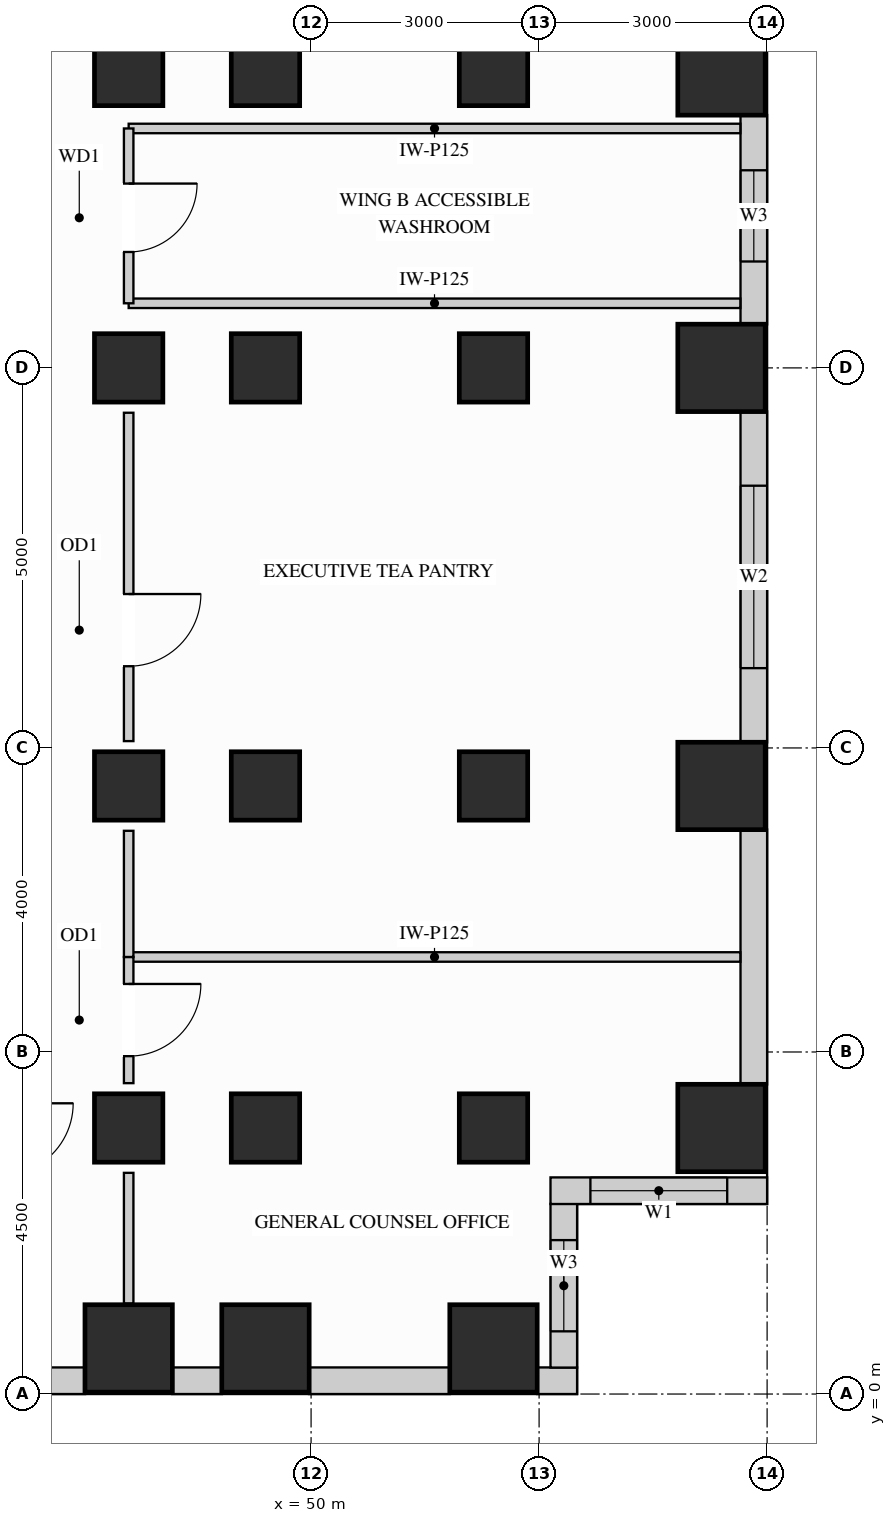
"""IFC4 building model, lengths in metres.
Left out: names, types, materials, properties, quantities, classifications, styles, units other than length and angle.
Written with IfcOpenShell. Run it as: python <this file> out.ifc"""

import sys

from ifc_helpers import new_model, si_unit, direction, frame, frame_2d, origin, origin_2d, place, context, subcontext, project, spatial, rectangle, extrude, source, transform, mapped, element, fill, save


model = new_model("IFC4")
c1 = context("Model", 3, precision=1e-05, world=origin(), true_north=direction((0.0, 1.0)))
c2 = subcontext(c1, "Body", "Model", "MODEL_VIEW")
j1 = project(units=[si_unit("LENGTHUNIT", "METRE"), si_unit("PLANEANGLEUNIT", "RADIAN")], contexts=[c1])
p1 = place(None, origin())
s1 = spatial("IfcSite", under=j1, at=p1, CompositionType="ELEMENT")
p2 = place(p1, origin())
s2 = spatial("IfcBuilding", under=s1, at=p2, CompositionType="ELEMENT")
p3 = place(p2, frame((0.0, 0.0, 113.4)))
s3 = spatial("IfcBuildingStorey", under=s2, at=p3, CompositionType="ELEMENT", Elevation=113.4)
m1 = source(origin(), c2, "Body", "SweptSolid", [
    extrude(rectangle(XDim=0.9, YDim=0.9, at=origin_2d()), origin(), (0.0, 0.0, 1.0), 3.38),
])
for number, where, z_axis, x_axis in (
    (1, (47.6, 13.5, 0.0), (0.0, 0.0, 1.0), (1.0, 0.0, 0.0)),
    (2, (47.6, 3.5, 0.0), (0.0, 0.0, 1.0), (1.0, 0.0, 0.0)),
    (3, (47.6, 8.0, 0.0), (0.0, 0.0, 1.0), (1.0, 0.0, 0.0)),
    (4, (47.6, 17.4, 0.0), (0.0, 0.0, 1.0), (1.0, 0.0, 0.0)),
    (5, (49.4, 13.5, 0.0), (0.0, 0.0, 1.0), (1.0, 0.0, 0.0)),
    (6, (49.4, 17.4, 0.0), (0.0, 0.0, 1.0), (1.0, 0.0, 0.0)),
    (7, (49.4, 3.5, 0.0), (0.0, 0.0, 1.0), (1.0, 0.0, 0.0)),
    (8, (49.4, 8.0, 0.0), (0.0, 0.0, 1.0), (1.0, 0.0, 0.0)),
    (9, (52.4, 13.5, 0.0), (0.0, 0.0, 1.0), (1.0, 0.0, 0.0)),
    (10, (52.4, 17.4, 0.0), (0.0, 0.0, 1.0), (1.0, 0.0, 0.0)),
    (11, (52.4, 3.5, 0.0), (0.0, 0.0, 1.0), (1.0, 0.0, 0.0)),
    (12, (52.4, 8.0, 0.0), (0.0, 0.0, 1.0), (1.0, 0.0, 0.0)),
):
    element("IfcColumn", number, at=place(p3, frame(where, z_axis=z_axis, x_axis=x_axis)), inside=s3, PredefinedType="COLUMN", context=c2, shape_type="MappedRepresentation", body=[
        mapped(m1, transform((0.0, 0.0, 0.0), x_axis=(1.0, 0.0, 0.0), y_axis=(0.0, 1.0, 0.0), z_axis=(0.0, 0.0, 1.0))),
    ])
m2 = source(origin(), c2, "Body", "SweptSolid", [
    extrude(rectangle(XDim=1.15, YDim=1.15, at=origin_2d()), origin(), (0.0, 0.0, 1.0), 3.38),
])
for number, where, z_axis, x_axis in (
    (13, (55.4, 13.5, 0.0), (0.0, 0.0, 1.0), (1.0, 0.0, 0.0)),
    (14, (55.4, 17.4, 0.0), (0.0, 0.0, 1.0), (1.0, 0.0, 0.0)),
    (15, (55.4, 3.5, 0.0), (0.0, 0.0, 1.0), (1.0, 0.0, 0.0)),
    (16, (55.4, 8.0, 0.0), (0.0, 0.0, 1.0), (1.0, 0.0, 0.0)),
    (17, (47.6, 0.6, 0.0), (0.0, 0.0, 1.0), (1.0, 0.0, 0.0)),
    (18, (49.4, 0.6, 0.0), (0.0, 0.0, 1.0), (1.0, 0.0, 0.0)),
    (19, (52.4, 0.6, 0.0), (0.0, 0.0, 1.0), (1.0, 0.0, 0.0)),
):
    element("IfcColumn", number, at=place(p3, frame(where, z_axis=z_axis, x_axis=x_axis)), inside=s3, PredefinedType="COLUMN", context=c2, shape_type="MappedRepresentation", body=[
        mapped(m2, transform((0.0, 0.0, 0.0), x_axis=(1.0, 0.0, 0.0), y_axis=(0.0, 1.0, 0.0), z_axis=(0.0, 0.0, 1.0))),
    ])
p4 = place(p3, frame((40.573, 0.175, 0.0), z_axis=(0.0, 0.0, 1.0), x_axis=(1.0, 0.0, 0.0)))
e20 = element("IfcWall", 20, at=p4, inside=s3, PredefinedType="SOLIDWALL", context=c2, shape_type="SweptSolid", body=[
    extrude(rectangle(XDim=6.454, YDim=0.35, at=frame_2d((3.227, 0.0))), origin(), (0.0, 0.0, 1.0), 3.365),
])
p5 = place(p4, frame((0.712, 0.0, 0.78)))
e21 = element("IfcOpeningElement", 21, at=p5, cuts=e20, PredefinedType="OPENING", context=c2, shape_type="SweptSolid", body=[
    extrude(rectangle(XDim=1.8, YDim=2.1, at=frame_2d((0.9, 1.05))), frame((0.0, 0.185, 0.0), z_axis=(0.0, -1.0, 0.0), x_axis=(1.0, 0.0, 0.0)), (0.0, 0.0, 1.0), 0.37),
])
p6 = place(p4, frame((2.905, 0.0, 0.78)))
e22 = element("IfcOpeningElement", 22, at=p6, cuts=e20, PredefinedType="OPENING", context=c2, shape_type="SweptSolid", body=[
    extrude(rectangle(XDim=1.8, YDim=2.1, at=frame_2d((0.9, 1.05))), frame((0.0, 0.185, 0.0), z_axis=(0.0, -1.0, 0.0), x_axis=(1.0, 0.0, 0.0)), (0.0, 0.0, 1.0), 0.37),
])
m3 = source(origin(), c2, "Body", "SweptSolid", [
    extrude(rectangle(XDim=0.654, YDim=0.35, at=frame_2d((0.327, 0.0))), origin(), (0.0, 0.0, 1.0), 3.365),
])
p7 = place(p3, frame((48.173, 0.175, 0.0), z_axis=(0.0, 0.0, 1.0), x_axis=(1.0, 0.0, 0.0)))
e23 = element("IfcWall", 23, at=p7, inside=s3, PredefinedType="SOLIDWALL", context=c2, shape_type="MappedRepresentation", body=[
    mapped(m3, transform((0.0, 0.0, 0.0), x_axis=(1.0, 0.0, 0.0), y_axis=(0.0, 1.0, 0.0), z_axis=(0.0, 0.0, 1.0))),
])
m4 = source(origin(), c2, "Body", "SweptSolid", [
    extrude(rectangle(XDim=1.854, YDim=0.35, at=frame_2d((0.927, 0.0))), origin(), (0.0, 0.0, 1.0), 3.365),
])
p8 = place(p3, frame((49.973, 0.175, 0.0), z_axis=(0.0, 0.0, 1.0), x_axis=(1.0, 0.0, 0.0)))
e24 = element("IfcWall", 24, at=p8, inside=s3, PredefinedType="SOLIDWALL", context=c2, shape_type="MappedRepresentation", body=[
    mapped(m4, transform((0.0, 0.0, 0.0), x_axis=(1.0, 0.0, 0.0), y_axis=(0.0, 1.0, 0.0), z_axis=(0.0, 0.0, 1.0))),
])
m5 = source(origin(), c2, "Body", "SweptSolid", [
    extrude(rectangle(XDim=0.527, YDim=0.35, at=frame_2d((0.264, 0.0))), origin(), (0.0, 0.0, 1.0), 3.365),
])
p9 = place(p3, frame((52.973, 0.175, 0.0), z_axis=(0.0, 0.0, 1.0), x_axis=(1.0, 0.0, 0.0)))
e25 = element("IfcWall", 25, at=p9, inside=s3, PredefinedType="SOLIDWALL", context=c2, shape_type="MappedRepresentation", body=[
    mapped(m5, transform((0.0, 0.0, 0.0), x_axis=(1.0, 0.0, 0.0), y_axis=(0.0, 1.0, 0.0), z_axis=(0.0, 0.0, 1.0))),
])
p10 = place(p3, frame((53.325, 0.348, 0.0), z_axis=(0.0, 0.0, 1.0), x_axis=(0.0, 1.0, 0.0)))
e26 = element("IfcWall", 26, at=p10, inside=s3, PredefinedType="SOLIDWALL", context=c2, shape_type="SweptSolid", body=[
    extrude(rectangle(XDim=2.154, YDim=0.35, at=frame_2d((1.077, 0.0))), origin(), (0.0, 0.0, 1.0), 3.365),
])
p11 = place(p10, frame((0.477, 0.0, 0.78)))
e27 = element("IfcOpeningElement", 27, at=p11, cuts=e26, PredefinedType="OPENING", context=c2, shape_type="SweptSolid", body=[
    extrude(rectangle(XDim=1.2, YDim=2.1, at=frame_2d((0.6, 1.05))), frame((0.0, 0.185, 0.0), z_axis=(0.0, -1.0, 0.0), x_axis=(1.0, 0.0, 0.0)), (0.0, 0.0, 1.0), 0.37),
])
p12 = place(p3, frame((53.15, 2.675, 0.0), z_axis=(0.0, 0.0, 1.0), x_axis=(1.0, 0.0, 0.0)))
e28 = element("IfcWall", 28, at=p12, inside=s3, PredefinedType="SOLIDWALL", context=c2, shape_type="SweptSolid", body=[
    extrude(rectangle(XDim=2.85, YDim=0.35, at=frame_2d((1.425, 0.0))), origin(), (0.0, 0.0, 1.0), 3.365),
])
p13 = place(p12, frame((0.525, 0.0, 0.78)))
e29 = element("IfcOpeningElement", 29, at=p13, cuts=e28, PredefinedType="OPENING", context=c2, shape_type="SweptSolid", body=[
    extrude(rectangle(XDim=1.8, YDim=2.1, at=frame_2d((0.9, 1.05))), frame((0.0, 0.185, 0.0), z_axis=(0.0, -1.0, 0.0), x_axis=(1.0, 0.0, 0.0)), (0.0, 0.0, 1.0), 0.37),
])
m6 = source(origin(), c2, "Body", "SweptSolid", [
    extrude(rectangle(XDim=3.354, YDim=0.35, at=frame_2d((1.677, 0.0))), origin(), (0.0, 0.0, 1.0), 3.365),
])
p14 = place(p3, frame((55.825, 4.073, 0.0), z_axis=(0.0, 0.0, 1.0), x_axis=(0.0, 1.0, 0.0)))
e30 = element("IfcWall", 30, at=p14, inside=s3, PredefinedType="SOLIDWALL", context=c2, shape_type="MappedRepresentation", body=[
    mapped(m6, transform((0.0, 0.0, 0.0), x_axis=(1.0, 0.0, 0.0), y_axis=(0.0, 1.0, 0.0), z_axis=(0.0, 0.0, 1.0))),
])
p15 = place(p3, frame((55.825, 8.573, 0.0), z_axis=(0.0, 0.0, 1.0), x_axis=(0.0, 1.0, 0.0)))
e31 = element("IfcWall", 31, at=p15, inside=s3, PredefinedType="SOLIDWALL", context=c2, shape_type="SweptSolid", body=[
    extrude(rectangle(XDim=4.354, YDim=0.35, at=frame_2d((2.177, 0.0))), origin(), (0.0, 0.0, 1.0), 3.365),
])
p16 = place(p15, frame((0.977, 0.0, 0.78)))
e32 = element("IfcOpeningElement", 32, at=p16, cuts=e31, PredefinedType="OPENING", context=c2, shape_type="SweptSolid", body=[
    extrude(rectangle(XDim=2.4, YDim=2.1, at=frame_2d((1.2, 1.05))), frame((0.0, 0.185, 0.0), z_axis=(0.0, -1.0, 0.0), x_axis=(1.0, 0.0, 0.0)), (0.0, 0.0, 1.0), 0.37),
])
p17 = place(p3, frame((55.825, 14.073, 0.0), z_axis=(0.0, 0.0, 1.0), x_axis=(0.0, 1.0, 0.0)))
e33 = element("IfcWall", 33, at=p17, inside=s3, PredefinedType="SOLIDWALL", context=c2, shape_type="SweptSolid", body=[
    extrude(rectangle(XDim=2.754, YDim=0.35, at=frame_2d((1.377, 0.0))), origin(), (0.0, 0.0, 1.0), 3.365),
])
p18 = place(p17, frame((0.827, 0.0, 0.78)))
e34 = element("IfcOpeningElement", 34, at=p18, cuts=e33, PredefinedType="OPENING", context=c2, shape_type="SweptSolid", body=[
    extrude(rectangle(XDim=1.2, YDim=2.1, at=frame_2d((0.6, 1.05))), frame((0.0, 0.185, 0.0), z_axis=(0.0, -1.0, 0.0), x_axis=(1.0, 0.0, 0.0)), (0.0, 0.0, 1.0), 0.37),
])
m7 = source(origin(), c2, "Body", "SweptSolid", [
    extrude(rectangle(XDim=8.048, YDim=0.125, at=frame_2d((4.024, 0.0))), origin(), (0.0, 0.0, 1.0), 3.365),
])
p19 = place(p3, frame((47.6, 14.35, 0.0), z_axis=(0.0, 0.0, 1.0), x_axis=(1.0, 0.0, 0.0)))
e35 = element("IfcWall", 35, at=p19, inside=s3, PredefinedType="PARTITIONING", context=c2, shape_type="MappedRepresentation", body=[
    mapped(m7, transform((0.0, 0.0, 0.0), x_axis=(1.0, 0.0, 0.0), y_axis=(0.0, 1.0, 0.0), z_axis=(0.0, 0.0, 1.0))),
])
m8 = source(origin(), c2, "Body", "SweptSolid", [
    extrude(rectangle(XDim=8.048, YDim=0.125, at=frame_2d((4.024, 0.0))), origin(), (0.0, 0.0, 1.0), 2.677),
])
p20 = place(p3, frame((47.6, 16.65, 0.0), z_axis=(0.0, 0.0, 1.0), x_axis=(1.0, 0.0, 0.0)))
e36 = element("IfcWall", 36, at=p20, inside=s3, PredefinedType="PARTITIONING", context=c2, shape_type="MappedRepresentation", body=[
    mapped(m8, transform((0.0, 0.0, 0.0), x_axis=(1.0, 0.0, 0.0), y_axis=(0.0, 1.0, 0.0), z_axis=(0.0, 0.0, 1.0))),
])
p21 = place(p3, frame((47.6, 5.75, 0.0), z_axis=(0.0, 0.0, 1.0), x_axis=(1.0, 0.0, 0.0)))
e37 = element("IfcWall", 37, at=p21, inside=s3, PredefinedType="PARTITIONING", context=c2, shape_type="MappedRepresentation", body=[
    mapped(m7, transform((0.0, 0.0, 0.0), x_axis=(1.0, 0.0, 0.0), y_axis=(0.0, 1.0, 0.0), z_axis=(0.0, 0.0, 1.0))),
])
p22 = place(p3, frame((47.6, 4.09, 0.0), z_axis=(0.0, 0.0, 1.0), x_axis=(0.0, 1.0, 0.0)))
e38 = element("IfcWall", 38, at=p22, inside=s3, PredefinedType="PARTITIONING", context=c2, shape_type="SweptSolid", body=[
    extrude(rectangle(XDim=1.66, YDim=0.125, at=frame_2d((0.83, 0.0))), origin(), (0.0, 0.0, 1.0), 2.677),
])
p23 = place(p22, frame((0.355, 0.0, 0.0)))
e39 = element("IfcOpeningElement", 39, at=p23, cuts=e38, PredefinedType="OPENING", context=c2, shape_type="SweptSolid", body=[
    extrude(rectangle(XDim=0.95, YDim=2.15, at=frame_2d((0.475, 1.075))), frame((0.0, 0.073, 0.0), z_axis=(0.0, -1.0, 0.0), x_axis=(1.0, 0.0, 0.0)), (0.0, 0.0, 1.0), 0.145),
])
m9 = source(origin(), c2, "Body", "SweptSolid", [
    extrude(rectangle(XDim=1.72, YDim=0.125, at=frame_2d((0.86, 0.0))), origin(), (0.0, 0.0, 1.0), 2.677),
])
p24 = place(p3, frame((47.6, 1.19, 0.0), z_axis=(0.0, 0.0, 1.0), x_axis=(0.0, 1.0, 0.0)))
e40 = element("IfcWall", 40, at=p24, inside=s3, PredefinedType="PARTITIONING", context=c2, shape_type="MappedRepresentation", body=[
    mapped(m9, transform((0.0, 0.0, 0.0), x_axis=(1.0, 0.0, 0.0), y_axis=(0.0, 1.0, 0.0), z_axis=(0.0, 0.0, 1.0))),
])
m10 = source(origin(), c2, "Body", "SweptSolid", [
    extrude(rectangle(XDim=1.66, YDim=0.125, at=frame_2d((0.83, 0.0))), origin(), (0.0, 0.0, 1.0), 2.677),
])
p25 = place(p3, frame((47.6, 5.75, 0.0), z_axis=(0.0, 0.0, 1.0), x_axis=(0.0, 1.0, 0.0)))
e41 = element("IfcWall", 41, at=p25, inside=s3, PredefinedType="PARTITIONING", context=c2, shape_type="MappedRepresentation", body=[
    mapped(m10, transform((0.0, 0.0, 0.0), x_axis=(1.0, 0.0, 0.0), y_axis=(0.0, 1.0, 0.0), z_axis=(0.0, 0.0, 1.0))),
])
p26 = place(p3, frame((47.6, 8.59, 0.0), z_axis=(0.0, 0.0, 1.0), x_axis=(0.0, 1.0, 0.0)))
e42 = element("IfcWall", 42, at=p26, inside=s3, PredefinedType="PARTITIONING", context=c2, shape_type="SweptSolid", body=[
    extrude(rectangle(XDim=4.32, YDim=0.125, at=frame_2d((2.16, 0.0))), origin(), (0.0, 0.0, 1.0), 2.677),
])
p27 = place(p26, frame((0.985, 0.0, 0.0)))
e43 = element("IfcOpeningElement", 43, at=p27, cuts=e42, PredefinedType="OPENING", context=c2, shape_type="SweptSolid", body=[
    extrude(rectangle(XDim=0.95, YDim=2.15, at=frame_2d((0.475, 1.075))), frame((0.0, 0.073, 0.0), z_axis=(0.0, -1.0, 0.0), x_axis=(1.0, 0.0, 0.0)), (0.0, 0.0, 1.0), 0.145),
])
p28 = place(p3, frame((47.6, 14.35, 0.0), z_axis=(0.0, 0.0, 1.0), x_axis=(0.0, 1.0, 0.0)))
e44 = element("IfcWall", 44, at=p28, inside=s3, PredefinedType="PARTITIONING", context=c2, shape_type="SweptSolid", body=[
    extrude(rectangle(XDim=2.3, YDim=0.125, at=frame_2d((1.15, 0.0))), origin(), (0.0, 0.0, 1.0), 2.677),
])
p29 = place(p28, frame((0.675, 0.0, 0.0)))
e45 = element("IfcOpeningElement", 45, at=p29, cuts=e44, PredefinedType="OPENING", context=c2, shape_type="SweptSolid", body=[
    extrude(rectangle(XDim=0.9, YDim=2.15, at=frame_2d((0.45, 1.075))), frame((0.0, 0.073, 0.0), z_axis=(0.0, -1.0, 0.0), x_axis=(1.0, 0.0, 0.0)), (0.0, 0.0, 1.0), 0.145),
])
m11 = source(origin(), c2, "Body", "SweptSolid", [
    extrude(rectangle(XDim=0.95, YDim=2.15, at=frame_2d((0.475, 1.075))), frame((0.0, 0.025, 0.0), z_axis=(0.0, -1.0, 0.0), x_axis=(1.0, 0.0, 0.0)), (0.0, 0.0, 1.0), 0.05),
])
p30 = place(p23, origin())
e46 = element("IfcDoor", 46, at=p30, inside=s3, OperationType="SINGLE_SWING_RIGHT", PredefinedType="DOOR", context=c2, shape_type="MappedRepresentation", body=[
    mapped(m11, transform((0.0, 0.0, 0.0), x_axis=(1.0, 0.0, 0.0), y_axis=(0.0, 1.0, 0.0), z_axis=(0.0, 0.0, 1.0))),
])
fill(e39, e46)
p31 = place(p27, origin())
e47 = element("IfcDoor", 47, at=p31, inside=s3, OperationType="SINGLE_SWING_RIGHT", PredefinedType="DOOR", context=c2, shape_type="MappedRepresentation", body=[
    mapped(m11, transform((0.0, 0.0, 0.0), x_axis=(1.0, 0.0, 0.0), y_axis=(0.0, 1.0, 0.0), z_axis=(0.0, 0.0, 1.0))),
])
fill(e43, e47)
m12 = source(origin(), c2, "Body", "SweptSolid", [
    extrude(rectangle(XDim=0.9, YDim=2.15, at=frame_2d((0.45, 1.075))), frame((0.0, 0.025, 0.0), z_axis=(0.0, -1.0, 0.0), x_axis=(1.0, 0.0, 0.0)), (0.0, 0.0, 1.0), 0.05),
])
p32 = place(p29, origin())
e48 = element("IfcDoor", 48, at=p32, inside=s3, OperationType="SINGLE_SWING_RIGHT", PredefinedType="DOOR", context=c2, shape_type="MappedRepresentation", body=[
    mapped(m12, transform((0.0, 0.0, 0.0), x_axis=(1.0, 0.0, 0.0), y_axis=(0.0, 1.0, 0.0), z_axis=(0.0, 0.0, 1.0))),
])
fill(e45, e48)
m13 = source(origin(), c2, "Body", "SweptSolid", [
    extrude(rectangle(XDim=1.8, YDim=2.1, at=frame_2d((0.9, 1.05))), frame((0.0, 0.03, 0.0), z_axis=(0.0, -1.0, 0.0), x_axis=(1.0, 0.0, 0.0)), (0.0, 0.0, 1.0), 0.06),
])
p33 = place(p13, origin())
e49 = element("IfcWindow", 49, at=p33, inside=s3, PartitioningType="SINGLE_PANEL", PredefinedType="WINDOW", context=c2, shape_type="MappedRepresentation", body=[
    mapped(m13, transform((0.0, 0.0, 0.0), x_axis=(1.0, 0.0, 0.0), y_axis=(0.0, 1.0, 0.0), z_axis=(0.0, 0.0, 1.0))),
])
fill(e29, e49)
m14 = source(origin(), c2, "Body", "SweptSolid", [
    extrude(rectangle(XDim=2.4, YDim=2.1, at=frame_2d((1.2, 1.05))), frame((0.0, 0.03, 0.0), z_axis=(0.0, -1.0, 0.0), x_axis=(1.0, 0.0, 0.0)), (0.0, 0.0, 1.0), 0.06),
])
p34 = place(p16, origin())
e50 = element("IfcWindow", 50, at=p34, inside=s3, PartitioningType="SINGLE_PANEL", PredefinedType="WINDOW", context=c2, shape_type="MappedRepresentation", body=[
    mapped(m14, transform((0.0, 0.0, 0.0), x_axis=(1.0, 0.0, 0.0), y_axis=(0.0, 1.0, 0.0), z_axis=(0.0, 0.0, 1.0))),
])
fill(e32, e50)
m15 = source(origin(), c2, "Body", "SweptSolid", [
    extrude(rectangle(XDim=1.2, YDim=2.1, at=frame_2d((0.6, 1.05))), frame((0.0, 0.03, 0.0), z_axis=(0.0, -1.0, 0.0), x_axis=(1.0, 0.0, 0.0)), (0.0, 0.0, 1.0), 0.06),
])
p35 = place(p11, origin())
e51 = element("IfcWindow", 51, at=p35, inside=s3, PartitioningType="SINGLE_PANEL", PredefinedType="WINDOW", context=c2, shape_type="MappedRepresentation", body=[
    mapped(m15, transform((0.0, 0.0, 0.0), x_axis=(1.0, 0.0, 0.0), y_axis=(0.0, 1.0, 0.0), z_axis=(0.0, 0.0, 1.0))),
])
fill(e27, e51)
p36 = place(p18, origin())
e52 = element("IfcWindow", 52, at=p36, inside=s3, PartitioningType="SINGLE_PANEL", PredefinedType="WINDOW", context=c2, shape_type="MappedRepresentation", body=[
    mapped(m15, transform((0.0, 0.0, 0.0), x_axis=(1.0, 0.0, 0.0), y_axis=(0.0, 1.0, 0.0), z_axis=(0.0, 0.0, 1.0))),
])
fill(e34, e52)
save(model, sys.argv[1])
